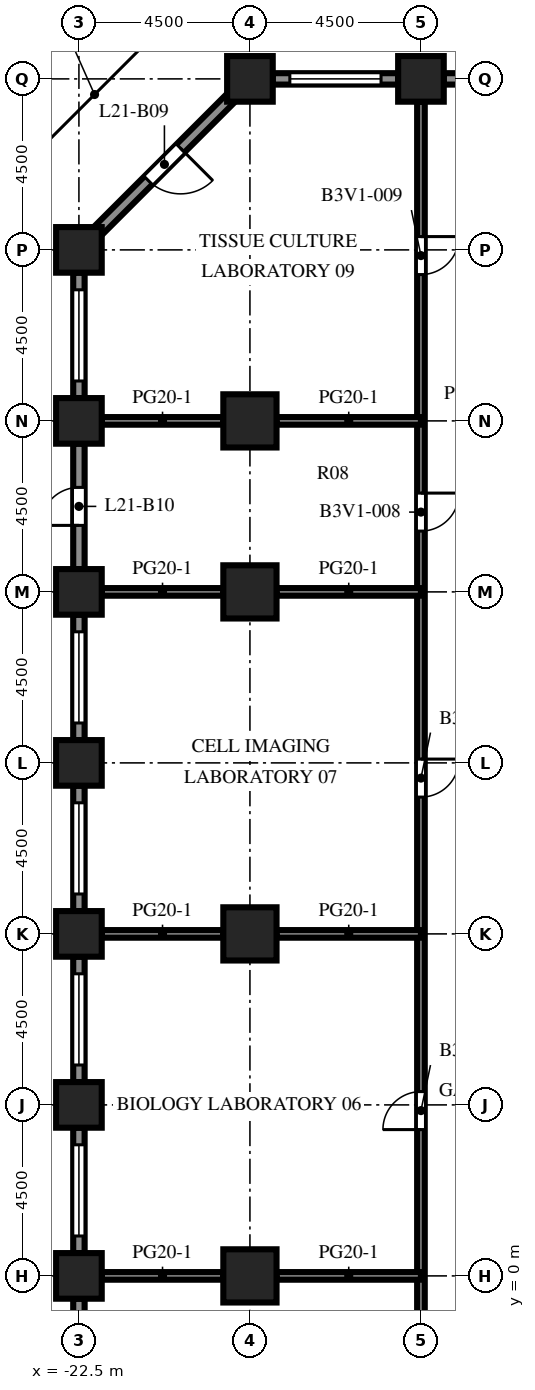
"""IFC4 building model, lengths in metres.
Left out: names, types, materials, properties, quantities, classifications, styles, units other than length and angle.
Written with IfcOpenShell. Run it as: python <this file> out.ifc"""

import sys

from ifc_helpers import new_model, si_unit, direction, frame, frame_2d, origin, origin_2d, place, context, subcontext, project, spatial, rectangle, extrude, element, fill, save


model = new_model("IFC4")
c1 = context("Model", 3, precision=1e-05, world=origin(), true_north=direction((0.0, 1.0)))
c2 = subcontext(c1, "Body", "Model", "MODEL_VIEW")
j1 = project(units=[si_unit("LENGTHUNIT", "METRE"), si_unit("PLANEANGLEUNIT", "RADIAN")], contexts=[c1])
p1 = place(None, origin())
s1 = spatial("IfcSite", under=j1, at=p1, CompositionType="ELEMENT")
p2 = place(p1, origin())
s2 = spatial("IfcBuilding", under=s1, at=p2, CompositionType="ELEMENT")
p3 = place(p2, frame((0.0, 0.0, 94.3)))
s3 = spatial("IfcBuildingStorey", under=s2, at=p3, CompositionType="ELEMENT", Elevation=94.3)
for number, where, z_axis, x_axis in (
    (1, (-22.5, 0.0, 0.0), (0.0, 0.0, 1.0), (1.0, 0.0, 0.0)),
    (2, (-22.5, 4.5, 0.0), (0.0, 0.0, 1.0), (1.0, 0.0, 0.0)),
    (3, (-22.5, 9.0, 0.0), (0.0, 0.0, 1.0), (1.0, 0.0, 0.0)),
    (4, (-22.5, 13.5, 0.0), (0.0, 0.0, 1.0), (1.0, 0.0, 0.0)),
    (5, (-22.5, 18.0, 0.0), (0.0, 0.0, 1.0), (1.0, 0.0, 0.0)),
    (6, (-22.5, 22.5, 0.0), (0.0, 0.0, 1.0), (1.0, 0.0, 0.0)),
    (7, (-22.5, 27.0, 0.0), (0.0, 0.0, 1.0), (1.0, 0.0, 0.0)),
    (8, (-18.0, 31.5, 0.0), (0.0, 0.0, 1.0), (1.0, 0.0, 0.0)),
    (9, (-13.5, 31.5, 0.0), (0.0, 0.0, 1.0), (1.0, 0.0, 0.0)),
):
    element("IfcColumn", number, at=place(p3, frame(where, z_axis=z_axis, x_axis=x_axis)), inside=s3, PredefinedType="COLUMN", context=c2, shape_type="SweptSolid", body=[
        extrude(rectangle(XDim=1.2, YDim=1.2, at=origin_2d()), origin(), (0.0, 0.0, 1.0), 4.1),
    ])
for number, where, z_axis, x_axis in (
    (10, (-18.0, 0.0, 0.0), (0.0, 0.0, 1.0), (1.0, 0.0, 0.0)),
    (11, (-18.0, 9.0, 0.0), (0.0, 0.0, 1.0), (1.0, 0.0, 0.0)),
    (12, (-18.0, 18.0, 0.0), (0.0, 0.0, 1.0), (1.0, 0.0, 0.0)),
    (13, (-18.0, 22.5, 0.0), (0.0, 0.0, 1.0), (1.0, 0.0, 0.0)),
):
    element("IfcColumn", number, at=place(p3, frame(where, z_axis=z_axis, x_axis=x_axis)), inside=s3, PredefinedType="COLUMN", context=c2, shape_type="SweptSolid", body=[
        extrude(rectangle(XDim=1.4, YDim=1.4, at=origin_2d()), origin(), (0.0, 0.0, 1.0), 4.1),
    ])
p4 = place(p3, frame((-12.9, 31.5, 0.0), z_axis=(0.0, 0.0, 1.0), x_axis=(1.0, 0.0, 0.0)))
e14 = element("IfcWall", 14, at=p4, inside=s3, PredefinedType="SOLIDWALL", context=c2, shape_type="SweptSolid", body=[
    extrude(rectangle(XDim=3.3, YDim=0.3, at=frame_2d((1.65, 0.0))), origin(), (0.0, 0.0, 1.0), 2.75),
])
p5 = place(p4, frame((1.15, 0.0, 0.0)))
e15 = element("IfcOpeningElement", 15, at=p5, cuts=e14, PredefinedType="OPENING", context=c2, shape_type="SweptSolid", body=[
    extrude(rectangle(XDim=1.0, YDim=2.2, at=frame_2d((0.5, 1.1))), frame((0.0, 0.16, 0.0), z_axis=(0.0, -1.0, 0.0), x_axis=(1.0, 0.0, 0.0)), (0.0, 0.0, 1.0), 0.32),
])
p6 = place(p3, frame((-17.4, 31.5, 0.0), z_axis=(0.0, 0.0, 1.0), x_axis=(1.0, 0.0, 0.0)))
e16 = element("IfcWall", 16, at=p6, inside=s3, PredefinedType="SOLIDWALL", context=c2, shape_type="SweptSolid", body=[
    extrude(rectangle(XDim=3.3, YDim=0.3, at=frame_2d((1.65, 0.0))), origin(), (0.0, 0.0, 1.0), 2.75),
])
p7 = place(p6, frame((0.45, 0.0, 0.8)))
e17 = element("IfcOpeningElement", 17, at=p7, cuts=e16, PredefinedType="OPENING", context=c2, shape_type="SweptSolid", body=[
    extrude(rectangle(XDim=2.4, YDim=1.7, at=frame_2d((1.2, 0.85))), frame((0.0, 0.16, 0.0), z_axis=(0.0, -1.0, 0.0), x_axis=(1.0, 0.0, 0.0)), (0.0, 0.0, 1.0), 0.32),
])
p8 = place(p3, frame((-22.006, 27.494, 0.0), z_axis=(0.0, 0.0, 1.0), x_axis=(0.707106781187, 0.707106781187, 0.0)))
e18 = element("IfcWall", 18, at=p8, inside=s3, PredefinedType="SOLIDWALL", context=c2, shape_type="SweptSolid", body=[
    extrude(rectangle(XDim=4.967, YDim=0.3, at=frame_2d((2.483, 0.0))), origin(), (0.0, 0.0, 1.0), 2.75),
])
p9 = place(p8, frame((1.884, 0.0, 0.0)))
e19 = element("IfcOpeningElement", 19, at=p9, cuts=e18, PredefinedType="OPENING", context=c2, shape_type="SweptSolid", body=[
    extrude(rectangle(XDim=1.2, YDim=2.2, at=frame_2d((0.6, 1.1))), frame((0.0, 0.16, 0.0), z_axis=(0.0, -1.0, 0.0), x_axis=(1.0, 0.0, 0.0)), (0.0, 0.0, 1.0), 0.32),
])
p10 = place(p3, frame((-22.5, 23.1, 0.0), z_axis=(0.0, 0.0, 1.0), x_axis=(0.0, 1.0, 0.0)))
e20 = element("IfcWall", 20, at=p10, inside=s3, PredefinedType="SOLIDWALL", context=c2, shape_type="SweptSolid", body=[
    extrude(rectangle(XDim=3.3, YDim=0.3, at=frame_2d((1.65, 0.0))), origin(), (0.0, 0.0, 1.0), 2.75),
])
p11 = place(p10, frame((0.45, 0.0, 0.8)))
e21 = element("IfcOpeningElement", 21, at=p11, cuts=e20, PredefinedType="OPENING", context=c2, shape_type="SweptSolid", body=[
    extrude(rectangle(XDim=2.4, YDim=1.7, at=frame_2d((1.2, 0.85))), frame((0.0, 0.16, 0.0), z_axis=(0.0, -1.0, 0.0), x_axis=(1.0, 0.0, 0.0)), (0.0, 0.0, 1.0), 0.32),
])
p12 = place(p3, frame((-22.5, 18.6, 0.0), z_axis=(0.0, 0.0, 1.0), x_axis=(0.0, 1.0, 0.0)))
e22 = element("IfcWall", 22, at=p12, inside=s3, PredefinedType="SOLIDWALL", context=c2, shape_type="SweptSolid", body=[
    extrude(rectangle(XDim=3.3, YDim=0.3, at=frame_2d((1.65, 0.0))), origin(), (0.0, 0.0, 1.0), 2.75),
])
p13 = place(p12, frame((1.15, 0.0, 0.0)))
e23 = element("IfcOpeningElement", 23, at=p13, cuts=e22, PredefinedType="OPENING", context=c2, shape_type="SweptSolid", body=[
    extrude(rectangle(XDim=1.0, YDim=2.2, at=frame_2d((0.5, 1.1))), frame((0.0, 0.16, 0.0), z_axis=(0.0, -1.0, 0.0), x_axis=(1.0, 0.0, 0.0)), (0.0, 0.0, 1.0), 0.32),
])
p14 = place(p3, frame((-22.5, 14.1, 0.0), z_axis=(0.0, 0.0, 1.0), x_axis=(0.0, 1.0, 0.0)))
e24 = element("IfcWall", 24, at=p14, inside=s3, PredefinedType="SOLIDWALL", context=c2, shape_type="SweptSolid", body=[
    extrude(rectangle(XDim=3.3, YDim=0.3, at=frame_2d((1.65, 0.0))), origin(), (0.0, 0.0, 1.0), 2.75),
])
p15 = place(p14, frame((0.45, 0.0, 0.8)))
e25 = element("IfcOpeningElement", 25, at=p15, cuts=e24, PredefinedType="OPENING", context=c2, shape_type="SweptSolid", body=[
    extrude(rectangle(XDim=2.4, YDim=1.7, at=frame_2d((1.2, 0.85))), frame((0.0, 0.16, 0.0), z_axis=(0.0, -1.0, 0.0), x_axis=(1.0, 0.0, 0.0)), (0.0, 0.0, 1.0), 0.32),
])
p16 = place(p3, frame((-22.5, 9.6, 0.0), z_axis=(0.0, 0.0, 1.0), x_axis=(0.0, 1.0, 0.0)))
e26 = element("IfcWall", 26, at=p16, inside=s3, PredefinedType="SOLIDWALL", context=c2, shape_type="SweptSolid", body=[
    extrude(rectangle(XDim=3.3, YDim=0.3, at=frame_2d((1.65, 0.0))), origin(), (0.0, 0.0, 1.0), 2.75),
])
p17 = place(p16, frame((0.45, 0.0, 0.8)))
e27 = element("IfcOpeningElement", 27, at=p17, cuts=e26, PredefinedType="OPENING", context=c2, shape_type="SweptSolid", body=[
    extrude(rectangle(XDim=2.4, YDim=1.7, at=frame_2d((1.2, 0.85))), frame((0.0, 0.16, 0.0), z_axis=(0.0, -1.0, 0.0), x_axis=(1.0, 0.0, 0.0)), (0.0, 0.0, 1.0), 0.32),
])
p18 = place(p3, frame((-22.5, 5.1, 0.0), z_axis=(0.0, 0.0, 1.0), x_axis=(0.0, 1.0, 0.0)))
e28 = element("IfcWall", 28, at=p18, inside=s3, PredefinedType="SOLIDWALL", context=c2, shape_type="SweptSolid", body=[
    extrude(rectangle(XDim=3.3, YDim=0.3, at=frame_2d((1.65, 0.0))), origin(), (0.0, 0.0, 1.0), 2.75),
])
p19 = place(p18, frame((0.45, 0.0, 0.8)))
e29 = element("IfcOpeningElement", 29, at=p19, cuts=e28, PredefinedType="OPENING", context=c2, shape_type="SweptSolid", body=[
    extrude(rectangle(XDim=2.4, YDim=1.7, at=frame_2d((1.2, 0.85))), frame((0.0, 0.16, 0.0), z_axis=(0.0, -1.0, 0.0), x_axis=(1.0, 0.0, 0.0)), (0.0, 0.0, 1.0), 0.32),
])
p20 = place(p3, frame((-22.5, 0.6, 0.0), z_axis=(0.0, 0.0, 1.0), x_axis=(0.0, 1.0, 0.0)))
e30 = element("IfcWall", 30, at=p20, inside=s3, PredefinedType="SOLIDWALL", context=c2, shape_type="SweptSolid", body=[
    extrude(rectangle(XDim=3.3, YDim=0.3, at=frame_2d((1.65, 0.0))), origin(), (0.0, 0.0, 1.0), 2.75),
])
p21 = place(p20, frame((0.45, 0.0, 0.8)))
e31 = element("IfcOpeningElement", 31, at=p21, cuts=e30, PredefinedType="OPENING", context=c2, shape_type="SweptSolid", body=[
    extrude(rectangle(XDim=2.4, YDim=1.7, at=frame_2d((1.2, 0.85))), frame((0.0, 0.16, 0.0), z_axis=(0.0, -1.0, 0.0), x_axis=(1.0, 0.0, 0.0)), (0.0, 0.0, 1.0), 0.32),
])
p22 = place(p3, frame((-22.5, -3.9, 0.0), z_axis=(0.0, 0.0, 1.0), x_axis=(0.0, 1.0, 0.0)))
e32 = element("IfcWall", 32, at=p22, inside=s3, PredefinedType="SOLIDWALL", context=c2, shape_type="SweptSolid", body=[
    extrude(rectangle(XDim=3.3, YDim=0.3, at=frame_2d((1.65, 0.0))), origin(), (0.0, 0.0, 1.0), 2.75),
])
p23 = place(p22, frame((0.45, 0.0, 0.8)))
e33 = element("IfcOpeningElement", 33, at=p23, cuts=e32, PredefinedType="OPENING", context=c2, shape_type="SweptSolid", body=[
    extrude(rectangle(XDim=2.4, YDim=1.7, at=frame_2d((1.2, 0.85))), frame((0.0, 0.16, 0.0), z_axis=(0.0, -1.0, 0.0), x_axis=(1.0, 0.0, 0.0)), (0.0, 0.0, 1.0), 0.32),
])
p24 = place(p3, frame((-13.5, -21.9, 0.0), z_axis=(0.0, 0.0, 1.0), x_axis=(0.0, 1.0, 0.0)))
e34 = element("IfcWall", 34, at=p24, inside=s3, PredefinedType="PARTITIONING", context=c2, shape_type="SweptSolid", body=[
    extrude(rectangle(XDim=52.8, YDim=0.2, at=frame_2d((26.4, 0.0))), origin(), (0.0, 0.0, 1.0), 3.65),
])
p25 = place(p24, frame((3.0, 0.0, 0.0)))
e35 = element("IfcOpeningElement", 35, at=p25, cuts=e34, PredefinedType="OPENING", context=c2, shape_type="SweptSolid", body=[
    extrude(rectangle(XDim=1.0, YDim=2.1, at=frame_2d((0.5, 1.05))), frame((0.0, 0.11, 0.0), z_axis=(0.0, -1.0, 0.0), x_axis=(1.0, 0.0, 0.0)), (0.0, 0.0, 1.0), 0.22),
])
p26 = place(p24, frame((15.0, 0.0, 0.0)))
e36 = element("IfcOpeningElement", 36, at=p26, cuts=e34, PredefinedType="OPENING", context=c2, shape_type="SweptSolid", body=[
    extrude(rectangle(XDim=1.0, YDim=2.1, at=frame_2d((0.5, 1.05))), frame((0.0, 0.11, 0.0), z_axis=(0.0, -1.0, 0.0), x_axis=(1.0, 0.0, 0.0)), (0.0, 0.0, 1.0), 0.22),
])
p27 = place(p24, frame((25.75, 0.0, 0.0)))
e37 = element("IfcOpeningElement", 37, at=p27, cuts=e34, PredefinedType="OPENING", context=c2, shape_type="SweptSolid", body=[
    extrude(rectangle(XDim=1.0, YDim=2.1, at=frame_2d((0.5, 1.05))), frame((0.0, 0.11, 0.0), z_axis=(0.0, -1.0, 0.0), x_axis=(1.0, 0.0, 0.0)), (0.0, 0.0, 1.0), 0.22),
])
p28 = place(p24, frame((34.5, 0.0, 0.0)))
e38 = element("IfcOpeningElement", 38, at=p28, cuts=e34, PredefinedType="OPENING", context=c2, shape_type="SweptSolid", body=[
    extrude(rectangle(XDim=1.0, YDim=2.1, at=frame_2d((0.5, 1.05))), frame((0.0, 0.11, 0.0), z_axis=(0.0, -1.0, 0.0), x_axis=(1.0, 0.0, 0.0)), (0.0, 0.0, 1.0), 0.22),
])
p29 = place(p24, frame((41.5, 0.0, 0.0)))
e39 = element("IfcOpeningElement", 39, at=p29, cuts=e34, PredefinedType="OPENING", context=c2, shape_type="SweptSolid", body=[
    extrude(rectangle(XDim=1.0, YDim=2.1, at=frame_2d((0.5, 1.05))), frame((0.0, 0.11, 0.0), z_axis=(0.0, -1.0, 0.0), x_axis=(1.0, 0.0, 0.0)), (0.0, 0.0, 1.0), 0.22),
])
p30 = place(p24, frame((48.25, 0.0, 0.0)))
e40 = element("IfcOpeningElement", 40, at=p30, cuts=e34, PredefinedType="OPENING", context=c2, shape_type="SweptSolid", body=[
    extrude(rectangle(XDim=1.0, YDim=2.1, at=frame_2d((0.5, 1.05))), frame((0.0, 0.11, 0.0), z_axis=(0.0, -1.0, 0.0), x_axis=(1.0, 0.0, 0.0)), (0.0, 0.0, 1.0), 0.22),
])
p31 = place(p3, frame((-21.9, 0.0, 0.0), z_axis=(0.0, 0.0, 1.0), x_axis=(1.0, 0.0, 0.0)))
e41 = element("IfcWall", 41, at=p31, inside=s3, PredefinedType="PARTITIONING", context=c2, shape_type="SweptSolid", body=[
    extrude(rectangle(XDim=3.2, YDim=0.2, at=frame_2d((1.6, 0.0))), origin(), (0.0, 0.0, 1.0), 3.65),
])
p32 = place(p3, frame((-17.3, 0.0, 0.0), z_axis=(0.0, 0.0, 1.0), x_axis=(1.0, 0.0, 0.0)))
e42 = element("IfcWall", 42, at=p32, inside=s3, PredefinedType="PARTITIONING", context=c2, shape_type="SweptSolid", body=[
    extrude(rectangle(XDim=3.8, YDim=0.2, at=frame_2d((1.9, 0.0))), origin(), (0.0, 0.0, 1.0), 3.65),
])
p33 = place(p3, frame((-21.9, 9.0, 0.0), z_axis=(0.0, 0.0, 1.0), x_axis=(1.0, 0.0, 0.0)))
e43 = element("IfcWall", 43, at=p33, inside=s3, PredefinedType="PARTITIONING", context=c2, shape_type="SweptSolid", body=[
    extrude(rectangle(XDim=3.2, YDim=0.2, at=frame_2d((1.6, 0.0))), origin(), (0.0, 0.0, 1.0), 3.65),
])
p34 = place(p3, frame((-17.3, 9.0, 0.0), z_axis=(0.0, 0.0, 1.0), x_axis=(1.0, 0.0, 0.0)))
e44 = element("IfcWall", 44, at=p34, inside=s3, PredefinedType="PARTITIONING", context=c2, shape_type="SweptSolid", body=[
    extrude(rectangle(XDim=3.8, YDim=0.2, at=frame_2d((1.9, 0.0))), origin(), (0.0, 0.0, 1.0), 3.65),
])
p35 = place(p3, frame((-21.9, 18.0, 0.0), z_axis=(0.0, 0.0, 1.0), x_axis=(1.0, 0.0, 0.0)))
e45 = element("IfcWall", 45, at=p35, inside=s3, PredefinedType="PARTITIONING", context=c2, shape_type="SweptSolid", body=[
    extrude(rectangle(XDim=3.2, YDim=0.2, at=frame_2d((1.6, 0.0))), origin(), (0.0, 0.0, 1.0), 3.65),
])
p36 = place(p3, frame((-17.3, 18.0, 0.0), z_axis=(0.0, 0.0, 1.0), x_axis=(1.0, 0.0, 0.0)))
e46 = element("IfcWall", 46, at=p36, inside=s3, PredefinedType="PARTITIONING", context=c2, shape_type="SweptSolid", body=[
    extrude(rectangle(XDim=3.8, YDim=0.2, at=frame_2d((1.9, 0.0))), origin(), (0.0, 0.0, 1.0), 3.65),
])
p37 = place(p3, frame((-21.9, 22.5, 0.0), z_axis=(0.0, 0.0, 1.0), x_axis=(1.0, 0.0, 0.0)))
e47 = element("IfcWall", 47, at=p37, inside=s3, PredefinedType="PARTITIONING", context=c2, shape_type="SweptSolid", body=[
    extrude(rectangle(XDim=3.2, YDim=0.2, at=frame_2d((1.6, 0.0))), origin(), (0.0, 0.0, 1.0), 3.65),
])
p38 = place(p3, frame((-17.3, 22.5, 0.0), z_axis=(0.0, 0.0, 1.0), x_axis=(1.0, 0.0, 0.0)))
e48 = element("IfcWall", 48, at=p38, inside=s3, PredefinedType="PARTITIONING", context=c2, shape_type="SweptSolid", body=[
    extrude(rectangle(XDim=3.8, YDim=0.2, at=frame_2d((1.9, 0.0))), origin(), (0.0, 0.0, 1.0), 3.65),
])
p39 = place(p7, origin())
e49 = element("IfcWindow", 49, at=p39, inside=s3, PartitioningType="SINGLE_PANEL", PredefinedType="WINDOW", context=c2, shape_type="SweptSolid", body=[
    extrude(rectangle(XDim=2.4, YDim=1.7, at=frame_2d((1.2, 0.85))), frame((0.0, 0.03, 0.0), z_axis=(0.0, -1.0, 0.0), x_axis=(1.0, 0.0, 0.0)), (0.0, 0.0, 1.0), 0.06),
])
fill(e17, e49)
p40 = place(p9, origin())
e50 = element("IfcDoor", 50, at=p40, inside=s3, OperationType="SINGLE_SWING_RIGHT", PredefinedType="DOOR", context=c2, shape_type="SweptSolid", body=[
    extrude(rectangle(XDim=1.2, YDim=2.2, at=frame_2d((0.6, 1.1))), frame((0.0, 0.025, 0.0), z_axis=(0.0, -1.0, 0.0), x_axis=(1.0, 0.0, 0.0)), (0.0, 0.0, 1.0), 0.05),
])
fill(e19, e50)
p41 = place(p11, origin())
e51 = element("IfcWindow", 51, at=p41, inside=s3, PartitioningType="SINGLE_PANEL", PredefinedType="WINDOW", context=c2, shape_type="SweptSolid", body=[
    extrude(rectangle(XDim=2.4, YDim=1.7, at=frame_2d((1.2, 0.85))), frame((0.0, 0.03, 0.0), z_axis=(0.0, -1.0, 0.0), x_axis=(1.0, 0.0, 0.0)), (0.0, 0.0, 1.0), 0.06),
])
fill(e21, e51)
p42 = place(p13, origin())
e52 = element("IfcDoor", 52, at=p42, inside=s3, OperationType="SINGLE_SWING_LEFT", PredefinedType="DOOR", context=c2, shape_type="SweptSolid", body=[
    extrude(rectangle(XDim=1.0, YDim=2.2, at=frame_2d((0.5, 1.1))), frame((0.0, 0.025, 0.0), z_axis=(0.0, -1.0, 0.0), x_axis=(1.0, 0.0, 0.0)), (0.0, 0.0, 1.0), 0.05),
])
fill(e23, e52)
p43 = place(p15, origin())
e53 = element("IfcWindow", 53, at=p43, inside=s3, PartitioningType="SINGLE_PANEL", PredefinedType="WINDOW", context=c2, shape_type="SweptSolid", body=[
    extrude(rectangle(XDim=2.4, YDim=1.7, at=frame_2d((1.2, 0.85))), frame((0.0, 0.03, 0.0), z_axis=(0.0, -1.0, 0.0), x_axis=(1.0, 0.0, 0.0)), (0.0, 0.0, 1.0), 0.06),
])
fill(e25, e53)
p44 = place(p17, origin())
e54 = element("IfcWindow", 54, at=p44, inside=s3, PartitioningType="SINGLE_PANEL", PredefinedType="WINDOW", context=c2, shape_type="SweptSolid", body=[
    extrude(rectangle(XDim=2.4, YDim=1.7, at=frame_2d((1.2, 0.85))), frame((0.0, 0.03, 0.0), z_axis=(0.0, -1.0, 0.0), x_axis=(1.0, 0.0, 0.0)), (0.0, 0.0, 1.0), 0.06),
])
fill(e27, e54)
p45 = place(p19, origin())
e55 = element("IfcWindow", 55, at=p45, inside=s3, PartitioningType="SINGLE_PANEL", PredefinedType="WINDOW", context=c2, shape_type="SweptSolid", body=[
    extrude(rectangle(XDim=2.4, YDim=1.7, at=frame_2d((1.2, 0.85))), frame((0.0, 0.03, 0.0), z_axis=(0.0, -1.0, 0.0), x_axis=(1.0, 0.0, 0.0)), (0.0, 0.0, 1.0), 0.06),
])
fill(e29, e55)
p46 = place(p21, origin())
e56 = element("IfcWindow", 56, at=p46, inside=s3, PartitioningType="SINGLE_PANEL", PredefinedType="WINDOW", context=c2, shape_type="SweptSolid", body=[
    extrude(rectangle(XDim=2.4, YDim=1.7, at=frame_2d((1.2, 0.85))), frame((0.0, 0.03, 0.0), z_axis=(0.0, -1.0, 0.0), x_axis=(1.0, 0.0, 0.0)), (0.0, 0.0, 1.0), 0.06),
])
fill(e31, e56)
p47 = place(p27, origin())
e57 = element("IfcDoor", 57, at=p47, inside=s3, OperationType="SINGLE_SWING_LEFT", PredefinedType="DOOR", context=c2, shape_type="SweptSolid", body=[
    extrude(rectangle(XDim=1.0, YDim=2.1, at=frame_2d((0.5, 1.05))), frame((0.0, 0.025, 0.0), z_axis=(0.0, -1.0, 0.0), x_axis=(1.0, 0.0, 0.0)), (0.0, 0.0, 1.0), 0.05),
])
fill(e37, e57)
p48 = place(p28, origin())
e58 = element("IfcDoor", 58, at=p48, inside=s3, OperationType="SINGLE_SWING_RIGHT", PredefinedType="DOOR", context=c2, shape_type="SweptSolid", body=[
    extrude(rectangle(XDim=1.0, YDim=2.1, at=frame_2d((0.5, 1.05))), frame((0.0, 0.025, 0.0), z_axis=(0.0, -1.0, 0.0), x_axis=(1.0, 0.0, 0.0)), (0.0, 0.0, 1.0), 0.05),
])
fill(e38, e58)
p49 = place(p29, origin())
e59 = element("IfcDoor", 59, at=p49, inside=s3, OperationType="SINGLE_SWING_RIGHT", PredefinedType="DOOR", context=c2, shape_type="SweptSolid", body=[
    extrude(rectangle(XDim=1.0, YDim=2.1, at=frame_2d((0.5, 1.05))), frame((0.0, 0.025, 0.0), z_axis=(0.0, -1.0, 0.0), x_axis=(1.0, 0.0, 0.0)), (0.0, 0.0, 1.0), 0.05),
])
fill(e39, e59)
p50 = place(p30, origin())
e60 = element("IfcDoor", 60, at=p50, inside=s3, OperationType="SINGLE_SWING_RIGHT", PredefinedType="DOOR", context=c2, shape_type="SweptSolid", body=[
    extrude(rectangle(XDim=1.0, YDim=2.1, at=frame_2d((0.5, 1.05))), frame((0.0, 0.025, 0.0), z_axis=(0.0, -1.0, 0.0), x_axis=(1.0, 0.0, 0.0)), (0.0, 0.0, 1.0), 0.05),
])
fill(e40, e60)
save(model, sys.argv[1])
